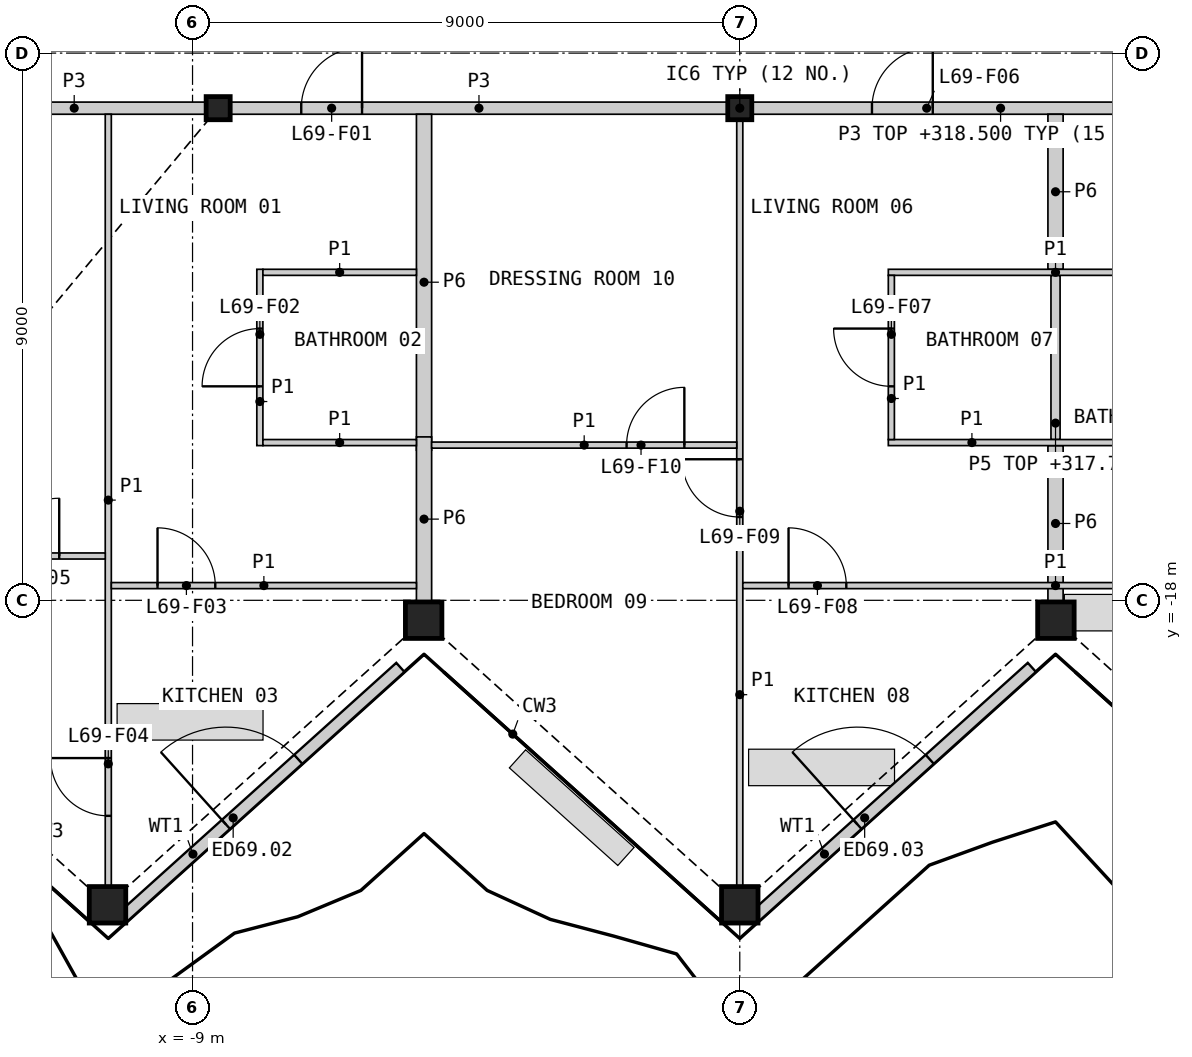
"""IFC4 building model, lengths in metres.
Left out: names, types, materials, properties, quantities, classifications, styles, units other than length and angle.
Written with IfcOpenShell. Run it as: python <this file> out.ifc"""

import sys

from ifc_helpers import new_model, si_unit, direction, frame, frame_2d, origin, origin_2d, place, context, subcontext, project, spatial, rectangle, hollow_rectangle, i_section, extrude, element, fill, save


model = new_model("IFC4")
c1 = context("Model", 3, precision=1e-05, world=origin(), true_north=direction((0.0, 1.0)))
c2 = subcontext(c1, "Body", "Model", "MODEL_VIEW")
j1 = project(units=[si_unit("LENGTHUNIT", "METRE"), si_unit("PLANEANGLEUNIT", "RADIAN")], contexts=[c1])
p1 = place(None, origin())
s1 = spatial("IfcSite", under=j1, at=p1, CompositionType="ELEMENT")
p2 = place(p1, origin())
s2 = spatial("IfcBuilding", under=s1, at=p2, CompositionType="ELEMENT")
p3 = place(p2, frame((0.0, 0.0, 315.4)))
s3 = spatial("IfcBuildingStorey", under=s2, at=p3, CompositionType="ELEMENT", Elevation=315.4)
for number, where, z_axis, x_axis in (
    (1, (-10.398, -23.008, 0.0), (0.0, 0.0, 1.0), (1.0, 0.0, 0.0)),
    (2, (-5.199, -18.327, 0.0), (0.0, 0.0, 1.0), (1.0, 0.0, 0.0)),
    (3, (0.0, -23.008, 0.0), (0.0, 0.0, 1.0), (1.0, 0.0, 0.0)),
    (4, (5.199, -18.327, 0.0), (0.0, 0.0, 1.0), (1.0, 0.0, 0.0)),
):
    element("IfcColumn", number, at=place(p3, frame(where, z_axis=z_axis, x_axis=x_axis)), inside=s3, PredefinedType="COLUMN", context=c2, shape_type="SweptSolid", body=[
        extrude(hollow_rectangle(XDim=0.6, YDim=0.6, WallThickness=0.04, at=origin_2d()), origin(), (0.0, 0.0, 1.0), 3.4),
    ])
for number, where, z_axis, x_axis in (
    (5, (-8.578, -9.906, 0.0), (0.0, 0.0, 1.0), (1.0, 0.0, 0.0)),
    (6, (0.0, -9.906, 0.0), (0.0, 0.0, 1.0), (1.0, 0.0, 0.0)),
):
    element("IfcColumn", number, at=place(p3, frame(where, z_axis=z_axis, x_axis=x_axis)), inside=s3, PredefinedType="COLUMN", context=c2, shape_type="SweptSolid", body=[
        extrude(i_section(OverallWidth=0.396, OverallDepth=0.381, WebThickness=0.019, FlangeThickness=0.03, at=origin_2d()), origin(), (0.0, 0.0, 1.0), 3.4),
    ])
p4 = place(p3, frame((-10.13, -23.198, 0.0), z_axis=(0.0, 0.0, 1.0), x_axis=(0.743139400616, 0.669136631229, 0.0)))
e7 = element("IfcWall", 7, at=p4, inside=s3, PredefinedType="SOLIDWALL", context=c2, shape_type="SweptSolid", body=[
    extrude(rectangle(XDim=6.12, YDim=0.2, at=frame_2d((3.06, 0.0))), origin(), (0.0, 0.0, 1.0), 2.488),
])
p5 = place(p4, frame((2.26, 0.0, 0.0)))
e8 = element("IfcOpeningElement", 8, at=p5, cuts=e7, PredefinedType="OPENING", context=c2, shape_type="SweptSolid", body=[
    extrude(rectangle(XDim=1.6, YDim=2.25, at=frame_2d((0.8, 1.125))), frame((0.0, 0.11, 0.0), z_axis=(0.0, -1.0, 0.0), x_axis=(1.0, 0.0, 0.0)), (0.0, 0.0, 1.0), 0.22),
])
p6 = place(p3, frame((0.256, -23.198, 0.0), z_axis=(0.0, 0.0, 1.0), x_axis=(0.743139400616, 0.669136631229, 0.0)))
e9 = element("IfcWall", 9, at=p6, inside=s3, PredefinedType="SOLIDWALL", context=c2, shape_type="SweptSolid", body=[
    extrude(rectangle(XDim=6.12, YDim=0.2, at=frame_2d((3.06, 0.0))), origin(), (0.0, 0.0, 1.0), 2.488),
])
p7 = place(p6, frame((2.26, 0.0, 0.0)))
e10 = element("IfcOpeningElement", 10, at=p7, cuts=e9, PredefinedType="OPENING", context=c2, shape_type="SweptSolid", body=[
    extrude(rectangle(XDim=1.6, YDim=2.25, at=frame_2d((0.8, 1.125))), frame((0.0, 0.11, 0.0), z_axis=(0.0, -1.0, 0.0), x_axis=(1.0, 0.0, 0.0)), (0.0, 0.0, 1.0), 0.22),
])
p8 = place(p3, frame((0.208, -9.906, 0.0), z_axis=(0.0, 0.0, 1.0), x_axis=(1.0, 0.0, 0.0)))
e11 = element("IfcWall", 11, at=p8, inside=s3, PredefinedType="PARTITIONING", context=c2, shape_type="SweptSolid", body=[
    extrude(rectangle(XDim=8.163, YDim=0.2, at=frame_2d((4.082, 0.0))), origin(), (0.0, 0.0, 1.0), 3.1),
])
p9 = place(p8, frame((1.966, 0.0, 0.0)))
e12 = element("IfcOpeningElement", 12, at=p9, cuts=e11, PredefinedType="OPENING", context=c2, shape_type="SweptSolid", body=[
    extrude(rectangle(XDim=1.0, YDim=2.1, at=frame_2d((0.5, 1.05))), frame((0.0, 0.11, 0.0), z_axis=(0.0, -1.0, 0.0), x_axis=(1.0, 0.0, 0.0)), (0.0, 0.0, 1.0), 0.22),
])
p10 = place(p8, frame((6.004, 0.0, 0.0)))
e13 = element("IfcOpeningElement", 13, at=p10, cuts=e11, PredefinedType="OPENING", context=c2, shape_type="SweptSolid", body=[
    extrude(rectangle(XDim=1.0, YDim=2.1, at=frame_2d((0.5, 1.05))), frame((0.0, 0.11, 0.0), z_axis=(0.0, -1.0, 0.0), x_axis=(1.0, 0.0, 0.0)), (0.0, 0.0, 1.0), 0.22),
])
p11 = place(p3, frame((-8.371, -9.906, 0.0), z_axis=(0.0, 0.0, 1.0), x_axis=(1.0, 0.0, 0.0)))
e14 = element("IfcWall", 14, at=p11, inside=s3, PredefinedType="PARTITIONING", context=c2, shape_type="SweptSolid", body=[
    extrude(rectangle(XDim=8.163, YDim=0.2, at=frame_2d((4.082, 0.0))), origin(), (0.0, 0.0, 1.0), 3.1),
])
p12 = place(p11, frame((1.159, 0.0, 0.0)))
e15 = element("IfcOpeningElement", 15, at=p12, cuts=e14, PredefinedType="OPENING", context=c2, shape_type="SweptSolid", body=[
    extrude(rectangle(XDim=1.0, YDim=2.1, at=frame_2d((0.5, 1.05))), frame((0.0, 0.11, 0.0), z_axis=(0.0, -1.0, 0.0), x_axis=(1.0, 0.0, 0.0)), (0.0, 0.0, 1.0), 0.22),
])
p13 = place(p3, frame((-5.193, -15.531, 0.0), z_axis=(0.0, 0.0, 1.0), x_axis=(0.0, 1.0, 0.0)))
e16 = element("IfcWall", 16, at=p13, inside=s3, PredefinedType="PARTITIONING", context=c2, shape_type="SweptSolid", body=[
    extrude(rectangle(XDim=5.525, YDim=0.25, at=frame_2d((2.762, 0.0))), origin(), (0.0, 0.0, 1.0), 2.33),
])
p14 = place(p3, frame((-13.106, -9.906, 0.0), z_axis=(0.0, 0.0, 1.0), x_axis=(1.0, 0.0, 0.0)))
e17 = element("IfcWall", 17, at=p14, inside=s3, PredefinedType="PARTITIONING", context=c2, shape_type="SweptSolid", body=[
    extrude(rectangle(XDim=4.32, YDim=0.2, at=frame_2d((2.16, 0.0))), origin(), (0.0, 0.0, 1.0), 3.1),
])
p15 = place(p3, frame((5.193, -12.556, 0.0), z_axis=(0.0, 0.0, 1.0), x_axis=(0.0, 1.0, 0.0)))
e18 = element("IfcWall", 18, at=p15, inside=s3, PredefinedType="PARTITIONING", context=c2, shape_type="SweptSolid", body=[
    extrude(rectangle(XDim=2.55, YDim=0.25, at=frame_2d((1.275, 0.0))), origin(), (0.0, 0.0, 1.0), 2.33),
])
p16 = place(p3, frame((5.193, -18.017, 0.0), z_axis=(0.0, 0.0, 1.0), x_axis=(0.0, 1.0, 0.0)))
e19 = element("IfcWall", 19, at=p16, inside=s3, PredefinedType="PARTITIONING", context=c2, shape_type="SweptSolid", body=[
    extrude(rectangle(XDim=2.561, YDim=0.25, at=frame_2d((1.281, 0.0))), origin(), (0.0, 0.0, 1.0), 2.33),
])
p17 = place(p3, frame((-5.193, -18.017, 0.0), z_axis=(0.0, 0.0, 1.0), x_axis=(0.0, 1.0, 0.0)))
e20 = element("IfcWall", 20, at=p17, inside=s3, PredefinedType="PARTITIONING", context=c2, shape_type="SweptSolid", body=[
    extrude(rectangle(XDim=2.705, YDim=0.25, at=frame_2d((1.352, 0.0))), origin(), (0.0, 0.0, 1.0), 2.33),
])
p18 = place(p3, frame((5.193, -15.356, 0.0), z_axis=(0.0, 0.0, 1.0), x_axis=(0.0, 1.0, 0.0)))
e21 = element("IfcWall", 21, at=p18, inside=s3, PredefinedType="PLUMBINGWALL", context=c2, shape_type="SweptSolid", body=[
    extrude(rectangle(XDim=2.7, YDim=0.15, at=frame_2d((1.35, 0.0))), origin(), (0.0, 0.0, 1.0), 2.33),
])
p19 = place(p3, frame((-10.385, -22.698, 0.0), z_axis=(0.0, 0.0, 1.0), x_axis=(0.0, 1.0, 0.0)))
e22 = element("IfcWall", 22, at=p19, inside=s3, PredefinedType="PARTITIONING", context=c2, shape_type="SweptSolid", body=[
    extrude(rectangle(XDim=12.692, YDim=0.1, at=frame_2d((6.346, 0.0))), origin(), (0.0, 0.0, 1.0), 2.33),
])
p20 = place(p19, frame((1.153, 0.0, 0.0)))
e23 = element("IfcOpeningElement", 23, at=p20, cuts=e22, PredefinedType="OPENING", context=c2, shape_type="SweptSolid", body=[
    extrude(rectangle(XDim=0.95, YDim=2.1, at=frame_2d((0.475, 1.05))), frame((0.0, 0.06, 0.0), z_axis=(0.0, -1.0, 0.0), x_axis=(1.0, 0.0, 0.0)), (0.0, 0.0, 1.0), 0.12),
])
p21 = place(p3, frame((0.0, -22.698, 0.0), z_axis=(0.0, 0.0, 1.0), x_axis=(0.0, 1.0, 0.0)))
e24 = element("IfcWall", 24, at=p21, inside=s3, PredefinedType="PARTITIONING", context=c2, shape_type="SweptSolid", body=[
    extrude(rectangle(XDim=12.585, YDim=0.1, at=frame_2d((6.292, 0.0))), origin(), (0.0, 0.0, 1.0), 2.33),
])
p22 = place(p21, frame((6.068, 0.0, 0.0)))
e25 = element("IfcOpeningElement", 25, at=p22, cuts=e24, PredefinedType="OPENING", context=c2, shape_type="SweptSolid", body=[
    extrude(rectangle(XDim=0.95, YDim=2.1, at=frame_2d((0.475, 1.05))), frame((0.0, 0.06, 0.0), z_axis=(0.0, -1.0, 0.0), x_axis=(1.0, 0.0, 0.0)), (0.0, 0.0, 1.0), 0.12),
])
p23 = place(p3, frame((0.05, -17.758, 0.0), z_axis=(0.0, 0.0, 1.0), x_axis=(1.0, 0.0, 0.0)))
e26 = element("IfcWall", 26, at=p23, inside=s3, PredefinedType="PARTITIONING", context=c2, shape_type="SweptSolid", body=[
    extrude(rectangle(XDim=10.286, YDim=0.1, at=frame_2d((5.143, 0.0))), origin(), (0.0, 0.0, 1.0), 2.33),
])
p24 = place(p23, frame((0.752, 0.0, 0.0)))
e27 = element("IfcOpeningElement", 27, at=p24, cuts=e26, PredefinedType="OPENING", context=c2, shape_type="SweptSolid", body=[
    extrude(rectangle(XDim=0.95, YDim=2.1, at=frame_2d((0.475, 1.05))), frame((0.0, 0.06, 0.0), z_axis=(0.0, -1.0, 0.0), x_axis=(1.0, 0.0, 0.0)), (0.0, 0.0, 1.0), 0.12),
])
p25 = place(p23, frame((8.584, 0.0, 0.0)))
e28 = element("IfcOpeningElement", 28, at=p25, cuts=e26, PredefinedType="OPENING", context=c2, shape_type="SweptSolid", body=[
    extrude(rectangle(XDim=0.95, YDim=2.1, at=frame_2d((0.475, 1.05))), frame((0.0, 0.06, 0.0), z_axis=(0.0, -1.0, 0.0), x_axis=(1.0, 0.0, 0.0)), (0.0, 0.0, 1.0), 0.12),
])
p26 = place(p3, frame((-17.158, -17.271, 0.0), z_axis=(0.0, 0.0, 1.0), x_axis=(1.0, 0.0, 0.0)))
e29 = element("IfcWall", 29, at=p26, inside=s3, PredefinedType="PARTITIONING", context=c2, shape_type="SweptSolid", body=[
    extrude(rectangle(XDim=6.722, YDim=0.1, at=frame_2d((3.361, 0.0))), origin(), (0.0, 0.0, 1.0), 2.33),
])
p27 = place(p26, frame((5.015, 0.0, 0.0)))
e30 = element("IfcOpeningElement", 30, at=p27, cuts=e29, PredefinedType="OPENING", context=c2, shape_type="SweptSolid", body=[
    extrude(rectangle(XDim=0.95, YDim=2.1, at=frame_2d((0.475, 1.05))), frame((0.0, 0.06, 0.0), z_axis=(0.0, -1.0, 0.0), x_axis=(1.0, 0.0, 0.0)), (0.0, 0.0, 1.0), 0.12),
])
for number, where, z_axis, x_axis in (
    (31, (2.443, -12.606, 0.0), (0.0, 0.0, 1.0), (1.0, 0.0, 0.0)),
    (32, (2.443, -15.406, 0.0), (0.0, 0.0, 1.0), (1.0, 0.0, 0.0)),
):
    element("IfcWall", number, at=place(p3, frame(where, z_axis=z_axis, x_axis=x_axis)), inside=s3, PredefinedType="PARTITIONING", context=c2, shape_type="SweptSolid", body=[
        extrude(rectangle(XDim=5.5, YDim=0.1, at=frame_2d((2.75, 0.0))), origin(), (0.0, 0.0, 1.0), 2.33),
    ])
p28 = place(p3, frame((-10.336, -17.758, 0.0), z_axis=(0.0, 0.0, 1.0), x_axis=(1.0, 0.0, 0.0)))
e33 = element("IfcWall", 33, at=p28, inside=s3, PredefinedType="PARTITIONING", context=c2, shape_type="SweptSolid", body=[
    extrude(rectangle(XDim=5.018, YDim=0.1, at=frame_2d((2.509, 0.0))), origin(), (0.0, 0.0, 1.0), 2.33),
])
p29 = place(p28, frame((0.76, 0.0, 0.0)))
e34 = element("IfcOpeningElement", 34, at=p29, cuts=e33, PredefinedType="OPENING", context=c2, shape_type="SweptSolid", body=[
    extrude(rectangle(XDim=0.95, YDim=2.1, at=frame_2d((0.475, 1.05))), frame((0.0, 0.06, 0.0), z_axis=(0.0, -1.0, 0.0), x_axis=(1.0, 0.0, 0.0)), (0.0, 0.0, 1.0), 0.12),
])
p30 = place(p3, frame((-5.068, -15.447, 0.0), z_axis=(0.0, 0.0, 1.0), x_axis=(1.0, 0.0, 0.0)))
e35 = element("IfcWall", 35, at=p30, inside=s3, PredefinedType="PARTITIONING", context=c2, shape_type="SweptSolid", body=[
    extrude(rectangle(XDim=5.018, YDim=0.1, at=frame_2d((2.509, 0.0))), origin(), (0.0, 0.0, 1.0), 2.33),
])
p31 = place(p30, frame((3.206, 0.0, 0.0)))
e36 = element("IfcOpeningElement", 36, at=p31, cuts=e35, PredefinedType="OPENING", context=c2, shape_type="SweptSolid", body=[
    extrude(rectangle(XDim=0.95, YDim=2.1, at=frame_2d((0.475, 1.05))), frame((0.0, 0.06, 0.0), z_axis=(0.0, -1.0, 0.0), x_axis=(1.0, 0.0, 0.0)), (0.0, 0.0, 1.0), 0.12),
])
p32 = place(p3, frame((-7.893, -15.456, 0.0), z_axis=(0.0, 0.0, 1.0), x_axis=(0.0, 1.0, 0.0)))
e37 = element("IfcWall", 37, at=p32, inside=s3, PredefinedType="PARTITIONING", context=c2, shape_type="SweptSolid", body=[
    extrude(rectangle(XDim=2.9, YDim=0.1, at=frame_2d((1.45, 0.0))), origin(), (0.0, 0.0, 1.0), 2.33),
])
p33 = place(p32, frame((0.975, 0.0, 0.0)))
e38 = element("IfcOpeningElement", 38, at=p33, cuts=e37, PredefinedType="OPENING", context=c2, shape_type="SweptSolid", body=[
    extrude(rectangle(XDim=0.95, YDim=2.1, at=frame_2d((0.475, 1.05))), frame((0.0, 0.06, 0.0), z_axis=(0.0, -1.0, 0.0), x_axis=(1.0, 0.0, 0.0)), (0.0, 0.0, 1.0), 0.12),
])
p34 = place(p3, frame((2.493, -15.356, 0.0), z_axis=(0.0, 0.0, 1.0), x_axis=(0.0, 1.0, 0.0)))
e39 = element("IfcWall", 39, at=p34, inside=s3, PredefinedType="PARTITIONING", context=c2, shape_type="SweptSolid", body=[
    extrude(rectangle(XDim=2.7, YDim=0.1, at=frame_2d((1.35, 0.0))), origin(), (0.0, 0.0, 1.0), 2.33),
])
p35 = place(p34, frame((0.875, 0.0, 0.0)))
e40 = element("IfcOpeningElement", 40, at=p35, cuts=e39, PredefinedType="OPENING", context=c2, shape_type="SweptSolid", body=[
    extrude(rectangle(XDim=0.95, YDim=2.1, at=frame_2d((0.475, 1.05))), frame((0.0, 0.06, 0.0), z_axis=(0.0, -1.0, 0.0), x_axis=(1.0, 0.0, 0.0)), (0.0, 0.0, 1.0), 0.12),
])
for number, where, z_axis, x_axis in (
    (41, (-7.843, -12.606, 0.0), (0.0, 0.0, 1.0), (1.0, 0.0, 0.0)),
    (42, (-7.843, -15.406, 0.0), (0.0, 0.0, 1.0), (1.0, 0.0, 0.0)),
):
    element("IfcWall", number, at=place(p3, frame(where, z_axis=z_axis, x_axis=x_axis)), inside=s3, PredefinedType="PARTITIONING", context=c2, shape_type="SweptSolid", body=[
        extrude(rectangle(XDim=2.525, YDim=0.1, at=frame_2d((1.262, 0.0))), origin(), (0.0, 0.0, 1.0), 2.33),
    ])
p36 = place(p5, origin())
e43 = element("IfcDoor", 43, at=p36, inside=s3, OperationType="DOUBLE_DOOR_SINGLE_SWING", PredefinedType="DOOR", context=c2, shape_type="SweptSolid", body=[
    extrude(rectangle(XDim=1.6, YDim=2.25, at=frame_2d((0.8, 1.125))), frame((0.0, 0.025, 0.0), z_axis=(0.0, -1.0, 0.0), x_axis=(1.0, 0.0, 0.0)), (0.0, 0.0, 1.0), 0.05),
])
fill(e8, e43)
p37 = place(p7, origin())
e44 = element("IfcDoor", 44, at=p37, inside=s3, OperationType="DOUBLE_DOOR_SINGLE_SWING", PredefinedType="DOOR", context=c2, shape_type="SweptSolid", body=[
    extrude(rectangle(XDim=1.6, YDim=2.25, at=frame_2d((0.8, 1.125))), frame((0.0, 0.025, 0.0), z_axis=(0.0, -1.0, 0.0), x_axis=(1.0, 0.0, 0.0)), (0.0, 0.0, 1.0), 0.05),
])
fill(e10, e44)
p38 = place(p12, origin())
e45 = element("IfcDoor", 45, at=p38, inside=s3, OperationType="SINGLE_SWING_RIGHT", PredefinedType="DOOR", context=c2, shape_type="SweptSolid", body=[
    extrude(rectangle(XDim=1.0, YDim=2.1, at=frame_2d((0.5, 1.05))), frame((0.0, 0.025, 0.0), z_axis=(0.0, -1.0, 0.0), x_axis=(1.0, 0.0, 0.0)), (0.0, 0.0, 1.0), 0.05),
])
fill(e15, e45)
p39 = place(p33, origin())
e46 = element("IfcDoor", 46, at=p39, inside=s3, OperationType="SINGLE_SWING_LEFT", PredefinedType="DOOR", context=c2, shape_type="SweptSolid", body=[
    extrude(rectangle(XDim=0.95, YDim=2.1, at=frame_2d((0.475, 1.05))), frame((0.0, 0.025, 0.0), z_axis=(0.0, -1.0, 0.0), x_axis=(1.0, 0.0, 0.0)), (0.0, 0.0, 1.0), 0.05),
])
fill(e38, e46)
p40 = place(p29, origin())
e47 = element("IfcDoor", 47, at=p40, inside=s3, OperationType="SINGLE_SWING_LEFT", PredefinedType="DOOR", context=c2, shape_type="SweptSolid", body=[
    extrude(rectangle(XDim=0.95, YDim=2.1, at=frame_2d((0.475, 1.05))), frame((0.0, 0.025, 0.0), z_axis=(0.0, -1.0, 0.0), x_axis=(1.0, 0.0, 0.0)), (0.0, 0.0, 1.0), 0.05),
])
fill(e34, e47)
p41 = place(p20, origin())
e48 = element("IfcDoor", 48, at=p41, inside=s3, OperationType="SINGLE_SWING_RIGHT", PredefinedType="DOOR", context=c2, shape_type="SweptSolid", body=[
    extrude(rectangle(XDim=0.95, YDim=2.1, at=frame_2d((0.475, 1.05))), frame((0.0, 0.025, 0.0), z_axis=(0.0, -1.0, 0.0), x_axis=(1.0, 0.0, 0.0)), (0.0, 0.0, 1.0), 0.05),
])
fill(e23, e48)
p42 = place(p27, origin())
e49 = element("IfcDoor", 49, at=p42, inside=s3, OperationType="SINGLE_SWING_RIGHT", PredefinedType="DOOR", context=c2, shape_type="SweptSolid", body=[
    extrude(rectangle(XDim=0.95, YDim=2.1, at=frame_2d((0.475, 1.05))), frame((0.0, 0.025, 0.0), z_axis=(0.0, -1.0, 0.0), x_axis=(1.0, 0.0, 0.0)), (0.0, 0.0, 1.0), 0.05),
])
fill(e30, e49)
p43 = place(p9, origin())
e50 = element("IfcDoor", 50, at=p43, inside=s3, OperationType="SINGLE_SWING_RIGHT", PredefinedType="DOOR", context=c2, shape_type="SweptSolid", body=[
    extrude(rectangle(XDim=1.0, YDim=2.1, at=frame_2d((0.5, 1.05))), frame((0.0, 0.025, 0.0), z_axis=(0.0, -1.0, 0.0), x_axis=(1.0, 0.0, 0.0)), (0.0, 0.0, 1.0), 0.05),
])
fill(e12, e50)
p44 = place(p35, origin())
e51 = element("IfcDoor", 51, at=p44, inside=s3, OperationType="SINGLE_SWING_RIGHT", PredefinedType="DOOR", context=c2, shape_type="SweptSolid", body=[
    extrude(rectangle(XDim=0.95, YDim=2.1, at=frame_2d((0.475, 1.05))), frame((0.0, 0.025, 0.0), z_axis=(0.0, -1.0, 0.0), x_axis=(1.0, 0.0, 0.0)), (0.0, 0.0, 1.0), 0.05),
])
fill(e40, e51)
p45 = place(p24, origin())
e52 = element("IfcDoor", 52, at=p45, inside=s3, OperationType="SINGLE_SWING_LEFT", PredefinedType="DOOR", context=c2, shape_type="SweptSolid", body=[
    extrude(rectangle(XDim=0.95, YDim=2.1, at=frame_2d((0.475, 1.05))), frame((0.0, 0.025, 0.0), z_axis=(0.0, -1.0, 0.0), x_axis=(1.0, 0.0, 0.0)), (0.0, 0.0, 1.0), 0.05),
])
fill(e27, e52)
p46 = place(p22, origin())
e53 = element("IfcDoor", 53, at=p46, inside=s3, OperationType="SINGLE_SWING_RIGHT", PredefinedType="DOOR", context=c2, shape_type="SweptSolid", body=[
    extrude(rectangle(XDim=0.95, YDim=2.1, at=frame_2d((0.475, 1.05))), frame((0.0, 0.025, 0.0), z_axis=(0.0, -1.0, 0.0), x_axis=(1.0, 0.0, 0.0)), (0.0, 0.0, 1.0), 0.05),
])
fill(e25, e53)
p47 = place(p31, origin())
e54 = element("IfcDoor", 54, at=p47, inside=s3, OperationType="SINGLE_SWING_RIGHT", PredefinedType="DOOR", context=c2, shape_type="SweptSolid", body=[
    extrude(rectangle(XDim=0.95, YDim=2.1, at=frame_2d((0.475, 1.05))), frame((0.0, 0.025, 0.0), z_axis=(0.0, -1.0, 0.0), x_axis=(1.0, 0.0, 0.0)), (0.0, 0.0, 1.0), 0.05),
])
fill(e36, e54)
save(model, sys.argv[1])
